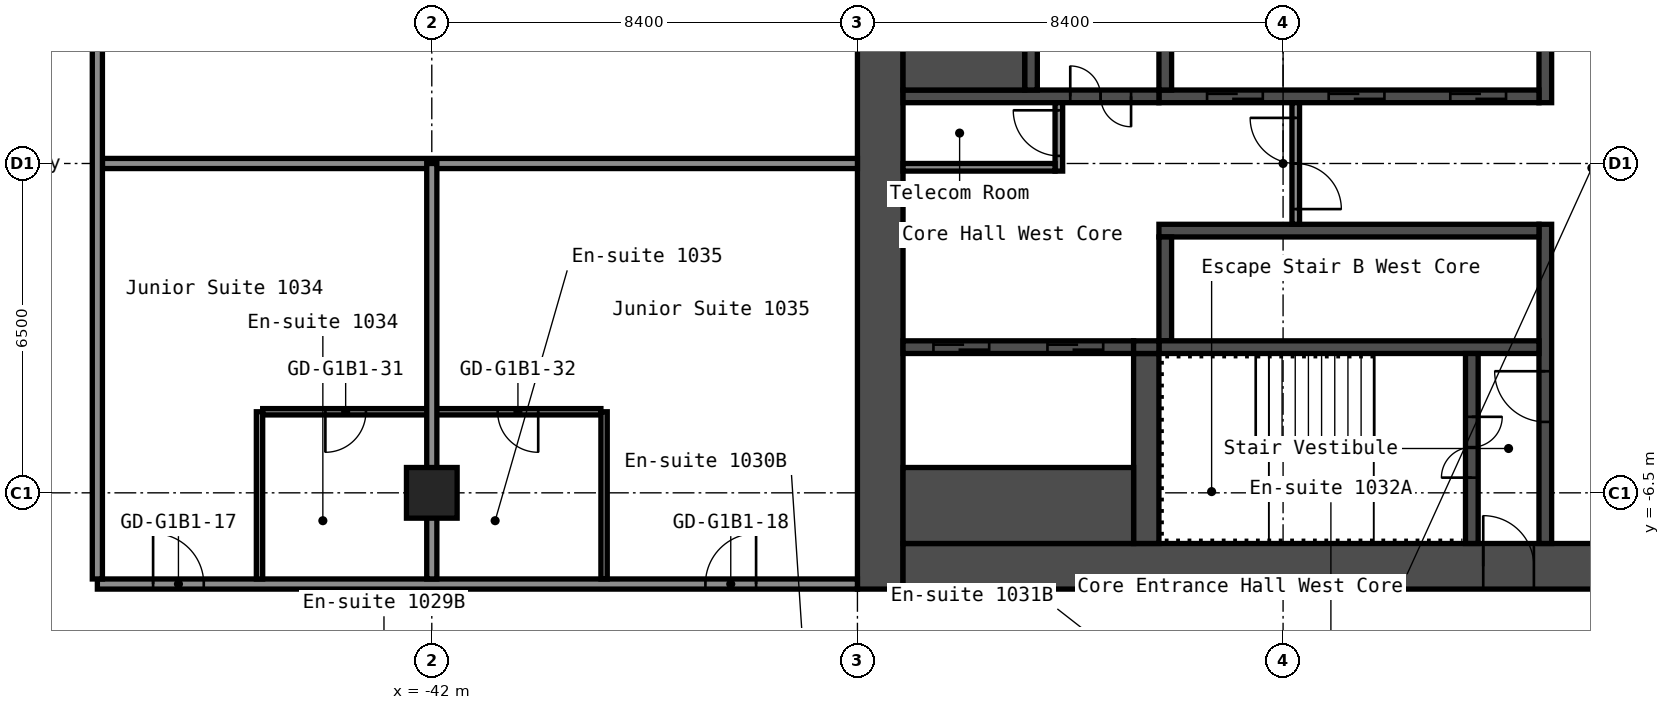
"""IFC4 building model, lengths in metres.
Left out: names, types, materials, properties, quantities, classifications, styles, units other than length and angle.
Written with IfcOpenShell. Run it as: python <this file> out.ifc"""

import sys

from ifc_helpers import new_model, si_unit, direction, frame, frame_2d, origin, origin_2d, place, context, subcontext, project, spatial, rectangle, hollow_rectangle, extrude, element, fill, save


model = new_model("IFC4")
c1 = context("Model", 3, precision=1e-05, world=origin(), true_north=direction((0.0, 1.0)))
c2 = subcontext(c1, "Body", "Model", "MODEL_VIEW")
j1 = project(units=[si_unit("LENGTHUNIT", "METRE"), si_unit("PLANEANGLEUNIT", "RADIAN")], contexts=[c1])
p1 = place(None, origin())
s1 = spatial("IfcSite", under=j1, at=p1, CompositionType="ELEMENT")
p2 = place(p1, origin())
s2 = spatial("IfcBuilding", under=s1, at=p2, CompositionType="ELEMENT")
p3 = place(p2, frame((0.0, 0.0, 39.0)))
s3 = spatial("IfcBuildingStorey", under=s2, at=p3, CompositionType="ELEMENT", Elevation=39.0)
p4 = place(p3, frame((-42.0, -6.5, 0.0), z_axis=(0.0, 0.0, 1.0), x_axis=(1.0, 0.0, 0.0)))
e1 = element("IfcColumn", 1, at=p4, inside=s3, PredefinedType="COLUMN", context=c2, shape_type="SweptSolid", body=[
    extrude(hollow_rectangle(XDim=1.0, YDim=1.0, WallThickness=0.04, at=origin_2d()), origin(), (0.0, 0.0, 1.0), 2.8),
])
p5 = place(p3, frame((-33.15, -8.4, 0.0), z_axis=(0.0, 0.0, 1.0), x_axis=(0.0, 1.0, 0.0)))
e2 = element("IfcWall", 2, at=p5, inside=s3, PredefinedType="SHEAR", context=c2, shape_type="SweptSolid", body=[
    extrude(rectangle(XDim=16.8, YDim=0.9, at=frame_2d((8.4, 0.0))), origin(), (0.0, 0.0, 1.0), 2.8),
])
p6 = place(p3, frame((-32.7, -7.95, 0.0), z_axis=(0.0, 0.0, 1.0), x_axis=(1.0, 0.0, 0.0)))
e3 = element("IfcWall", 3, at=p6, inside=s3, PredefinedType="SHEAR", context=c2, shape_type="SweptSolid", body=[
    extrude(rectangle(XDim=15.0, YDim=0.9, at=frame_2d((7.5, 0.0))), origin(), (0.0, 0.0, 1.0), 2.8),
])
p7 = place(p6, frame((11.45, 0.0, 0.0)))
e4 = element("IfcOpeningElement", 4, at=p7, cuts=e3, PredefinedType="OPENING", context=c2, shape_type="SweptSolid", body=[
    extrude(rectangle(XDim=1.0, YDim=2.1, at=frame_2d((0.5, 1.05))), frame((0.0, 0.46, 0.0), z_axis=(0.0, -1.0, 0.0), x_axis=(1.0, 0.0, 0.0)), (0.0, 0.0, 1.0), 0.92),
])
p8 = place(p3, frame((-20.025, 1.2, 0.0), z_axis=(0.0, 0.0, 1.0), x_axis=(0.0, 1.0, 0.0)))
e5 = element("IfcWall", 5, at=p8, inside=s3, PredefinedType="SHEAR", context=c2, shape_type="SweptSolid", body=[
    extrude(rectangle(XDim=6.3, YDim=0.25, at=frame_2d((3.15, 0.0))), origin(), (0.0, 0.0, 1.0), 2.8),
])
p9 = place(p3, frame((-20.025, -7.5, 0.0), z_axis=(0.0, 0.0, 1.0), x_axis=(0.0, 1.0, 0.0)))
e6 = element("IfcWall", 6, at=p9, inside=s3, PredefinedType="SHEAR", context=c2, shape_type="SweptSolid", body=[
    extrude(rectangle(XDim=6.3, YDim=0.25, at=frame_2d((3.15, 0.0))), origin(), (0.0, 0.0, 1.0), 2.8),
])
p10 = place(p9, frame((2.4, 0.0, 0.0)))
e7 = element("IfcOpeningElement", 7, at=p10, cuts=e6, PredefinedType="OPENING", context=c2, shape_type="SweptSolid", body=[
    extrude(rectangle(XDim=1.0, YDim=2.1, at=frame_2d((0.5, 1.05))), frame((0.0, 0.135, 0.0), z_axis=(0.0, -1.0, 0.0), x_axis=(1.0, 0.0, 0.0)), (0.0, 0.0, 1.0), 0.27),
])
p11 = place(p3, frame((-27.65, 1.325, 0.0), z_axis=(0.0, 0.0, 1.0), x_axis=(1.0, 0.0, 0.0)))
e8 = element("IfcWall", 8, at=p11, inside=s3, PredefinedType="SHEAR", context=c2, shape_type="SweptSolid", body=[
    extrude(rectangle(XDim=7.5, YDim=0.25, at=frame_2d((3.75, 0.0))), origin(), (0.0, 0.0, 1.0), 2.8),
])
p12 = place(p11, frame((5.75, 0.0, 0.0)))
e9 = element("IfcOpeningElement", 9, at=p12, cuts=e8, PredefinedType="OPENING", context=c2, shape_type="SweptSolid", body=[
    extrude(rectangle(XDim=1.1, YDim=2.1, at=frame_2d((0.55, 1.05))), frame((0.0, 0.135, 0.0), z_axis=(0.0, -1.0, 0.0), x_axis=(1.0, 0.0, 0.0)), (0.0, 0.0, 1.0), 0.27),
])
p13 = place(p11, frame((3.35, 0.0, 0.0)))
e10 = element("IfcOpeningElement", 10, at=p13, cuts=e8, PredefinedType="OPENING", context=c2, shape_type="SweptSolid", body=[
    extrude(rectangle(XDim=1.1, YDim=2.1, at=frame_2d((0.55, 1.05))), frame((0.0, 0.135, 0.0), z_axis=(0.0, -1.0, 0.0), x_axis=(1.0, 0.0, 0.0)), (0.0, 0.0, 1.0), 0.27),
])
p14 = place(p11, frame((0.95, 0.0, 0.0)))
e11 = element("IfcOpeningElement", 11, at=p14, cuts=e8, PredefinedType="OPENING", context=c2, shape_type="SweptSolid", body=[
    extrude(rectangle(XDim=1.1, YDim=2.1, at=frame_2d((0.55, 1.05))), frame((0.0, 0.135, 0.0), z_axis=(0.0, -1.0, 0.0), x_axis=(1.0, 0.0, 0.0)), (0.0, 0.0, 1.0), 0.27),
])
p15 = place(p3, frame((-27.525, 1.45, 0.0), z_axis=(0.0, 0.0, 1.0), x_axis=(0.0, 1.0, 0.0)))
e12 = element("IfcWall", 12, at=p15, inside=s3, PredefinedType="SHEAR", context=c2, shape_type="SweptSolid", body=[
    extrude(rectangle(XDim=2.05, YDim=0.25, at=frame_2d((1.025, 0.0))), origin(), (0.0, 0.0, 1.0), 2.8),
])
p16 = place(p3, frame((-32.7, 1.325, 0.0), z_axis=(0.0, 0.0, 1.0), x_axis=(1.0, 0.0, 0.0)))
e13 = element("IfcWall", 13, at=p16, inside=s3, PredefinedType="SHEAR", context=c2, shape_type="SweptSolid", body=[
    extrude(rectangle(XDim=5.05, YDim=0.25, at=frame_2d((2.525, 0.0))), origin(), (0.0, 0.0, 1.0), 2.8),
])
p17 = place(p16, frame((3.3, 0.0, 0.0)))
e14 = element("IfcOpeningElement", 14, at=p17, cuts=e13, PredefinedType="OPENING", context=c2, shape_type="SweptSolid", body=[
    extrude(rectangle(XDim=1.2, YDim=2.1, at=frame_2d((0.6, 1.05))), frame((0.0, 0.135, 0.0), z_axis=(0.0, -1.0, 0.0), x_axis=(1.0, 0.0, 0.0)), (0.0, 0.0, 1.0), 0.27),
])
p18 = place(p3, frame((-30.175, 1.45, 0.0), z_axis=(0.0, 0.0, 1.0), x_axis=(0.0, 1.0, 0.0)))
e15 = element("IfcWall", 15, at=p18, inside=s3, PredefinedType="SHEAR", context=c2, shape_type="SweptSolid", body=[
    extrude(rectangle(XDim=6.05, YDim=0.25, at=frame_2d((3.025, 0.0))), origin(), (0.0, 0.0, 1.0), 2.8),
])
p19 = place(p18, frame((2.625, 0.0, 0.0)))
e16 = element("IfcOpeningElement", 16, at=p19, cuts=e15, PredefinedType="OPENING", context=c2, shape_type="SweptSolid", body=[
    extrude(rectangle(XDim=1.1, YDim=2.1, at=frame_2d((0.55, 1.05))), frame((0.0, 0.135, 0.0), z_axis=(0.0, -1.0, 0.0), x_axis=(1.0, 0.0, 0.0)), (0.0, 0.0, 1.0), 0.27),
])
p20 = place(p3, frame((-32.7, 2.375, 0.0), z_axis=(0.0, 0.0, 1.0), x_axis=(1.0, 0.0, 0.0)))
e17 = element("IfcWall", 17, at=p20, inside=s3, PredefinedType="SHEAR", context=c2, shape_type="SweptSolid", body=[
    extrude(rectangle(XDim=2.4, YDim=1.85, at=frame_2d((1.2, 0.0))), origin(), (0.0, 0.0, 1.0), 2.8),
])
p21 = place(p3, frame((-27.65, -1.325, 0.0), z_axis=(0.0, 0.0, 1.0), x_axis=(1.0, 0.0, 0.0)))
e18 = element("IfcWall", 18, at=p21, inside=s3, PredefinedType="SHEAR", context=c2, shape_type="SweptSolid", body=[
    extrude(rectangle(XDim=7.5, YDim=0.25, at=frame_2d((3.75, 0.0))), origin(), (0.0, 0.0, 1.0), 2.8),
])
p22 = place(p3, frame((-27.525, -3.5, 0.0), z_axis=(0.0, 0.0, 1.0), x_axis=(0.0, 1.0, 0.0)))
e19 = element("IfcWall", 19, at=p22, inside=s3, PredefinedType="SHEAR", context=c2, shape_type="SweptSolid", body=[
    extrude(rectangle(XDim=2.05, YDim=0.25, at=frame_2d((1.025, 0.0))), origin(), (0.0, 0.0, 1.0), 2.8),
])
p23 = place(p3, frame((-27.65, -3.625, 0.0), z_axis=(0.0, 0.0, 1.0), x_axis=(1.0, 0.0, 0.0)))
e20 = element("IfcWall", 20, at=p23, inside=s3, PredefinedType="SHEAR", context=c2, shape_type="SweptSolid", body=[
    extrude(rectangle(XDim=7.5, YDim=0.25, at=frame_2d((3.75, 0.0))), origin(), (0.0, 0.0, 1.0), 2.8),
])
p24 = place(p3, frame((-21.475, -7.5, 0.0), z_axis=(0.0, 0.0, 1.0), x_axis=(0.0, 1.0, 0.0)))
e21 = element("IfcWall", 21, at=p24, inside=s3, PredefinedType="SHEAR", context=c2, shape_type="SweptSolid", body=[
    extrude(rectangle(XDim=3.75, YDim=0.25, at=frame_2d((1.875, 0.0))), origin(), (0.0, 0.0, 1.0), 2.8),
])
p25 = place(p24, frame((1.3, 0.0, 0.0)))
e22 = element("IfcOpeningElement", 22, at=p25, cuts=e21, PredefinedType="OPENING", context=c2, shape_type="SweptSolid", body=[
    extrude(rectangle(XDim=1.2, YDim=2.1, at=frame_2d((0.6, 1.05))), frame((0.0, 0.135, 0.0), z_axis=(0.0, -1.0, 0.0), x_axis=(1.0, 0.0, 0.0)), (0.0, 0.0, 1.0), 0.27),
])
p26 = place(p3, frame((-27.9, -7.5, 0.0), z_axis=(0.0, 0.0, 1.0), x_axis=(0.0, 1.0, 0.0)))
e23 = element("IfcWall", 23, at=p26, inside=s3, PredefinedType="SHEAR", context=c2, shape_type="SweptSolid", body=[
    extrude(rectangle(XDim=3.75, YDim=0.5, at=frame_2d((1.875, 0.0))), origin(), (0.0, 0.0, 1.0), 2.8),
])
p27 = place(p3, frame((-32.7, -3.625, 0.0), z_axis=(0.0, 0.0, 1.0), x_axis=(1.0, 0.0, 0.0)))
e24 = element("IfcWall", 24, at=p27, inside=s3, PredefinedType="SHEAR", context=c2, shape_type="SweptSolid", body=[
    extrude(rectangle(XDim=4.55, YDim=0.25, at=frame_2d((2.275, 0.0))), origin(), (0.0, 0.0, 1.0), 2.8),
])
p28 = place(p27, frame((2.85, 0.0, 0.0)))
e25 = element("IfcOpeningElement", 25, at=p28, cuts=e24, PredefinedType="OPENING", context=c2, shape_type="SweptSolid", body=[
    extrude(rectangle(XDim=1.1, YDim=2.1, at=frame_2d((0.55, 1.05))), frame((0.0, 0.135, 0.0), z_axis=(0.0, -1.0, 0.0), x_axis=(1.0, 0.0, 0.0)), (0.0, 0.0, 1.0), 0.27),
])
p29 = place(p27, frame((0.6, 0.0, 0.0)))
e26 = element("IfcOpeningElement", 26, at=p29, cuts=e24, PredefinedType="OPENING", context=c2, shape_type="SweptSolid", body=[
    extrude(rectangle(XDim=1.1, YDim=2.1, at=frame_2d((0.55, 1.05))), frame((0.0, 0.135, 0.0), z_axis=(0.0, -1.0, 0.0), x_axis=(1.0, 0.0, 0.0)), (0.0, 0.0, 1.0), 0.27),
])
p30 = place(p3, frame((-32.7, -6.75, 0.0), z_axis=(0.0, 0.0, 1.0), x_axis=(1.0, 0.0, 0.0)))
e27 = element("IfcWall", 27, at=p30, inside=s3, PredefinedType="SHEAR", context=c2, shape_type="SweptSolid", body=[
    extrude(rectangle(XDim=4.55, YDim=1.5, at=frame_2d((2.275, 0.0))), origin(), (0.0, 0.0, 1.0), 2.8),
])
p31 = place(p3, frame((-28.15, -3.625, 0.0), z_axis=(0.0, 0.0, 1.0), x_axis=(1.0, 0.0, 0.0)))
e28 = element("IfcWall", 28, at=p31, inside=s3, PredefinedType="SHEAR", context=c2, shape_type="SweptSolid", body=[
    extrude(rectangle(XDim=0.5, YDim=0.25, at=frame_2d((0.25, 0.0))), origin(), (0.0, 0.0, 1.0), 2.8),
])
p32 = place(p3, frame((-24.95, -1.2, 0.0), z_axis=(0.0, 0.0, 1.0), x_axis=(0.0, 1.0, 0.0)))
e29 = element("IfcWall", 29, at=p32, inside=s3, PredefinedType="PARTITIONING", context=c2, shape_type="SweptSolid", body=[
    extrude(rectangle(XDim=2.4, YDim=0.15, at=frame_2d((1.2, 0.0))), origin(), (0.0, 0.0, 1.0), 2.8),
])
p33 = place(p32, frame((0.3, 0.0, 0.0)))
e30 = element("IfcOpeningElement", 30, at=p33, cuts=e29, PredefinedType="OPENING", context=c2, shape_type="SweptSolid", body=[
    extrude(rectangle(XDim=1.8, YDim=2.1, at=frame_2d((0.9, 1.05))), frame((0.0, 0.085, 0.0), z_axis=(0.0, -1.0, 0.0), x_axis=(1.0, 0.0, 0.0)), (0.0, 0.0, 1.0), 0.17),
])
p34 = place(p3, frame((-29.625, -0.15, 0.0), z_axis=(0.0, 0.0, 1.0), x_axis=(0.0, 1.0, 0.0)))
e31 = element("IfcWall", 31, at=p34, inside=s3, PredefinedType="PARTITIONING", context=c2, shape_type="SweptSolid", body=[
    extrude(rectangle(XDim=1.35, YDim=0.15, at=frame_2d((0.675, 0.0))), origin(), (0.0, 0.0, 1.0), 2.8),
])
p35 = place(p34, frame((0.3, 0.0, 0.0)))
e32 = element("IfcOpeningElement", 32, at=p35, cuts=e31, PredefinedType="OPENING", context=c2, shape_type="SweptSolid", body=[
    extrude(rectangle(XDim=0.9, YDim=2.1, at=frame_2d((0.45, 1.05))), frame((0.0, 0.085, 0.0), z_axis=(0.0, -1.0, 0.0), x_axis=(1.0, 0.0, 0.0)), (0.0, 0.0, 1.0), 0.17),
])
p36 = place(p3, frame((-32.7, -0.075, 0.0), z_axis=(0.0, 0.0, 1.0), x_axis=(1.0, 0.0, 0.0)))
e33 = element("IfcWall", 33, at=p36, inside=s3, PredefinedType="PARTITIONING", context=c2, shape_type="SweptSolid", body=[
    extrude(rectangle(XDim=3.0, YDim=0.15, at=frame_2d((1.5, 0.0))), origin(), (0.0, 0.0, 1.0), 2.8),
])
p37 = place(p3, frame((-48.6, -8.3, 0.0), z_axis=(0.0, 0.0, 1.0), x_axis=(1.0, 0.0, 0.0)))
e34 = element("IfcWall", 34, at=p37, inside=s3, PredefinedType="PARTITIONING", context=c2, shape_type="SweptSolid", body=[
    extrude(rectangle(XDim=15.0, YDim=0.2, at=frame_2d((7.5, 0.0))), origin(), (0.0, 0.0, 1.0), 2.8),
])
p38 = place(p37, frame((1.1, 0.0, 0.0)))
e35 = element("IfcOpeningElement", 35, at=p38, cuts=e34, PredefinedType="OPENING", context=c2, shape_type="SweptSolid", body=[
    extrude(rectangle(XDim=1.0, YDim=2.1, at=frame_2d((0.5, 1.05))), frame((0.0, 0.11, 0.0), z_axis=(0.0, -1.0, 0.0), x_axis=(1.0, 0.0, 0.0)), (0.0, 0.0, 1.0), 0.22),
])
p39 = place(p37, frame((12.0, 0.0, 0.0)))
e36 = element("IfcOpeningElement", 36, at=p39, cuts=e34, PredefinedType="OPENING", context=c2, shape_type="SweptSolid", body=[
    extrude(rectangle(XDim=1.0, YDim=2.1, at=frame_2d((0.5, 1.05))), frame((0.0, 0.11, 0.0), z_axis=(0.0, -1.0, 0.0), x_axis=(1.0, 0.0, 0.0)), (0.0, 0.0, 1.0), 0.22),
])
p40 = place(p3, frame((-45.337, -4.9, 0.0), z_axis=(0.0, 0.0, 1.0), x_axis=(1.0, 0.0, 0.0)))
e37 = element("IfcWall", 37, at=p40, inside=s3, PredefinedType="PARTITIONING", context=c2, shape_type="SweptSolid", body=[
    extrude(rectangle(XDim=6.675, YDim=0.125, at=frame_2d((3.337, 0.0))), origin(), (0.0, 0.0, 1.0), 2.8),
])
p41 = place(p40, frame((1.238, 0.0, 0.0)))
e38 = element("IfcOpeningElement", 38, at=p41, cuts=e37, PredefinedType="OPENING", context=c2, shape_type="SweptSolid", body=[
    extrude(rectangle(XDim=0.8, YDim=2.1, at=frame_2d((0.4, 1.05))), frame((0.0, 0.073, 0.0), z_axis=(0.0, -1.0, 0.0), x_axis=(1.0, 0.0, 0.0)), (0.0, 0.0, 1.0), 0.145),
])
p42 = place(p40, frame((4.637, 0.0, 0.0)))
e39 = element("IfcOpeningElement", 39, at=p42, cuts=e37, PredefinedType="OPENING", context=c2, shape_type="SweptSolid", body=[
    extrude(rectangle(XDim=0.8, YDim=2.1, at=frame_2d((0.4, 1.05))), frame((0.0, 0.073, 0.0), z_axis=(0.0, -1.0, 0.0), x_axis=(1.0, 0.0, 0.0)), (0.0, 0.0, 1.0), 0.145),
])
p43 = place(p3, frame((-48.5, 0.0, 0.0), z_axis=(0.0, 0.0, 1.0), x_axis=(1.0, 0.0, 0.0)))
e40 = element("IfcWall", 40, at=p43, inside=s3, PredefinedType="PARTITIONING", context=c2, shape_type="SweptSolid", body=[
    extrude(rectangle(XDim=14.9, YDim=0.2, at=frame_2d((7.45, 0.0))), origin(), (0.0, 0.0, 1.0), 2.8),
])
p44 = place(p3, frame((-48.6, -8.2, 0.0), z_axis=(0.0, 0.0, 1.0), x_axis=(0.0, 1.0, 0.0)))
e41 = element("IfcWall", 41, at=p44, inside=s3, PredefinedType="PARTITIONING", context=c2, shape_type="SweptSolid", body=[
    extrude(rectangle(XDim=16.4, YDim=0.2, at=frame_2d((8.2, 0.0))), origin(), (0.0, 0.0, 1.0), 2.8),
])
p45 = place(p3, frame((-45.4, -8.2, 0.0), z_axis=(0.0, 0.0, 1.0), x_axis=(0.0, 1.0, 0.0)))
e42 = element("IfcWall", 42, at=p45, inside=s3, PredefinedType="PARTITIONING", context=c2, shape_type="SweptSolid", body=[
    extrude(rectangle(XDim=3.3, YDim=0.125, at=frame_2d((1.65, 0.0))), origin(), (0.0, 0.0, 1.0), 2.8),
])
p46 = place(p3, frame((-42.0, -8.2, 0.0), z_axis=(0.0, 0.0, 1.0), x_axis=(0.0, 1.0, 0.0)))
e43 = element("IfcWall", 43, at=p46, inside=s3, PredefinedType="PARTITIONING", context=c2, shape_type="SweptSolid", body=[
    extrude(rectangle(XDim=8.2, YDim=0.2, at=frame_2d((4.1, 0.0))), origin(), (0.0, 0.0, 1.0), 2.8),
])
p47 = place(p3, frame((-38.6, -8.2, 0.0), z_axis=(0.0, 0.0, 1.0), x_axis=(0.0, 1.0, 0.0)))
e44 = element("IfcWall", 44, at=p47, inside=s3, PredefinedType="PARTITIONING", context=c2, shape_type="SweptSolid", body=[
    extrude(rectangle(XDim=3.3, YDim=0.125, at=frame_2d((1.65, 0.0))), origin(), (0.0, 0.0, 1.0), 2.8),
])
p48 = place(p7, origin())
e45 = element("IfcDoor", 45, at=p48, inside=s3, OperationType="SINGLE_SWING_RIGHT", PredefinedType="DOOR", context=c2, shape_type="SweptSolid", body=[
    extrude(rectangle(XDim=1.0, YDim=2.1, at=frame_2d((0.5, 1.05))), frame((0.0, 0.025, 0.0), z_axis=(0.0, -1.0, 0.0), x_axis=(1.0, 0.0, 0.0)), (0.0, 0.0, 1.0), 0.05),
])
fill(e4, e45)
p49 = place(p25, origin())
e46 = element("IfcDoor", 46, at=p49, inside=s3, OperationType="DOUBLE_DOOR_SINGLE_SWING", PredefinedType="DOOR", context=c2, shape_type="SweptSolid", body=[
    extrude(rectangle(XDim=1.2, YDim=2.1, at=frame_2d((0.6, 1.05))), frame((0.0, 0.025, 0.0), z_axis=(0.0, -1.0, 0.0), x_axis=(1.0, 0.0, 0.0)), (0.0, 0.0, 1.0), 0.05),
])
fill(e22, e46)
p50 = place(p10, origin())
e47 = element("IfcDoor", 47, at=p50, inside=s3, OperationType="SINGLE_SWING_LEFT", PredefinedType="DOOR", context=c2, shape_type="SweptSolid", body=[
    extrude(rectangle(XDim=1.0, YDim=2.1, at=frame_2d((0.5, 1.05))), frame((0.0, 0.025, 0.0), z_axis=(0.0, -1.0, 0.0), x_axis=(1.0, 0.0, 0.0)), (0.0, 0.0, 1.0), 0.05),
])
fill(e7, e47)
p51 = place(p17, origin())
e48 = element("IfcDoor", 48, at=p51, inside=s3, OperationType="DOUBLE_DOOR_SINGLE_SWING", PredefinedType="DOOR", context=c2, shape_type="SweptSolid", body=[
    extrude(rectangle(XDim=1.2, YDim=2.1, at=frame_2d((0.6, 1.05))), frame((0.0, 0.025, 0.0), z_axis=(0.0, -1.0, 0.0), x_axis=(1.0, 0.0, 0.0)), (0.0, 0.0, 1.0), 0.05),
])
fill(e14, e48)
p52 = place(p33, origin())
e49 = element("IfcDoor", 49, at=p52, inside=s3, OperationType="DOUBLE_DOOR_SINGLE_SWING", PredefinedType="DOOR", context=c2, shape_type="SweptSolid", body=[
    extrude(rectangle(XDim=1.8, YDim=2.1, at=frame_2d((0.9, 1.05))), frame((0.0, 0.025, 0.0), z_axis=(0.0, -1.0, 0.0), x_axis=(1.0, 0.0, 0.0)), (0.0, 0.0, 1.0), 0.05),
])
fill(e30, e49)
p53 = place(p35, origin())
e50 = element("IfcDoor", 50, at=p53, inside=s3, OperationType="SINGLE_SWING_LEFT", PredefinedType="DOOR", context=c2, shape_type="SweptSolid", body=[
    extrude(rectangle(XDim=0.9, YDim=2.1, at=frame_2d((0.45, 1.05))), frame((0.0, 0.025, 0.0), z_axis=(0.0, -1.0, 0.0), x_axis=(1.0, 0.0, 0.0)), (0.0, 0.0, 1.0), 0.05),
])
fill(e32, e50)
p54 = place(p12, origin())
e51 = element("IfcDoor", 51, at=p54, inside=s3, OperationType="DOUBLE_DOOR_SLIDING", PredefinedType="DOOR", context=c2, shape_type="SweptSolid", body=[
    extrude(rectangle(XDim=1.1, YDim=2.1, at=frame_2d((0.55, 1.05))), frame((0.0, 0.025, 0.0), z_axis=(0.0, -1.0, 0.0), x_axis=(1.0, 0.0, 0.0)), (0.0, 0.0, 1.0), 0.05),
])
fill(e9, e51)
p55 = place(p13, origin())
e52 = element("IfcDoor", 52, at=p55, inside=s3, OperationType="DOUBLE_DOOR_SLIDING", PredefinedType="DOOR", context=c2, shape_type="SweptSolid", body=[
    extrude(rectangle(XDim=1.1, YDim=2.1, at=frame_2d((0.55, 1.05))), frame((0.0, 0.025, 0.0), z_axis=(0.0, -1.0, 0.0), x_axis=(1.0, 0.0, 0.0)), (0.0, 0.0, 1.0), 0.05),
])
fill(e10, e52)
p56 = place(p14, origin())
e53 = element("IfcDoor", 53, at=p56, inside=s3, OperationType="DOUBLE_DOOR_SLIDING", PredefinedType="DOOR", context=c2, shape_type="SweptSolid", body=[
    extrude(rectangle(XDim=1.1, YDim=2.1, at=frame_2d((0.55, 1.05))), frame((0.0, 0.025, 0.0), z_axis=(0.0, -1.0, 0.0), x_axis=(1.0, 0.0, 0.0)), (0.0, 0.0, 1.0), 0.05),
])
fill(e11, e53)
p57 = place(p28, origin())
e54 = element("IfcDoor", 54, at=p57, inside=s3, OperationType="DOUBLE_DOOR_SLIDING", PredefinedType="DOOR", context=c2, shape_type="SweptSolid", body=[
    extrude(rectangle(XDim=1.1, YDim=2.1, at=frame_2d((0.55, 1.05))), frame((0.0, 0.025, 0.0), z_axis=(0.0, -1.0, 0.0), x_axis=(1.0, 0.0, 0.0)), (0.0, 0.0, 1.0), 0.05),
])
fill(e25, e54)
p58 = place(p29, origin())
e55 = element("IfcDoor", 55, at=p58, inside=s3, OperationType="DOUBLE_DOOR_SLIDING", PredefinedType="DOOR", context=c2, shape_type="SweptSolid", body=[
    extrude(rectangle(XDim=1.1, YDim=2.1, at=frame_2d((0.55, 1.05))), frame((0.0, 0.025, 0.0), z_axis=(0.0, -1.0, 0.0), x_axis=(1.0, 0.0, 0.0)), (0.0, 0.0, 1.0), 0.05),
])
fill(e26, e55)
p59 = place(p38, origin())
e56 = element("IfcDoor", 56, at=p59, inside=s3, OperationType="SINGLE_SWING_RIGHT", PredefinedType="DOOR", context=c2, shape_type="SweptSolid", body=[
    extrude(rectangle(XDim=1.0, YDim=2.1, at=frame_2d((0.5, 1.05))), frame((0.0, 0.025, 0.0), z_axis=(0.0, -1.0, 0.0), x_axis=(1.0, 0.0, 0.0)), (0.0, 0.0, 1.0), 0.05),
])
fill(e35, e56)
p60 = place(p39, origin())
e57 = element("IfcDoor", 57, at=p60, inside=s3, OperationType="SINGLE_SWING_LEFT", PredefinedType="DOOR", context=c2, shape_type="SweptSolid", body=[
    extrude(rectangle(XDim=1.0, YDim=2.1, at=frame_2d((0.5, 1.05))), frame((0.0, 0.025, 0.0), z_axis=(0.0, -1.0, 0.0), x_axis=(1.0, 0.0, 0.0)), (0.0, 0.0, 1.0), 0.05),
])
fill(e36, e57)
p61 = place(p41, origin())
e58 = element("IfcDoor", 58, at=p61, inside=s3, OperationType="SINGLE_SWING_LEFT", PredefinedType="DOOR", context=c2, shape_type="SweptSolid", body=[
    extrude(rectangle(XDim=0.8, YDim=2.1, at=frame_2d((0.4, 1.05))), frame((0.0, 0.025, 0.0), z_axis=(0.0, -1.0, 0.0), x_axis=(1.0, 0.0, 0.0)), (0.0, 0.0, 1.0), 0.05),
])
fill(e38, e58)
p62 = place(p42, origin())
e59 = element("IfcDoor", 59, at=p62, inside=s3, OperationType="SINGLE_SWING_RIGHT", PredefinedType="DOOR", context=c2, shape_type="SweptSolid", body=[
    extrude(rectangle(XDim=0.8, YDim=2.1, at=frame_2d((0.4, 1.05))), frame((0.0, 0.025, 0.0), z_axis=(0.0, -1.0, 0.0), x_axis=(1.0, 0.0, 0.0)), (0.0, 0.0, 1.0), 0.05),
])
fill(e39, e59)
save(model, sys.argv[1])
